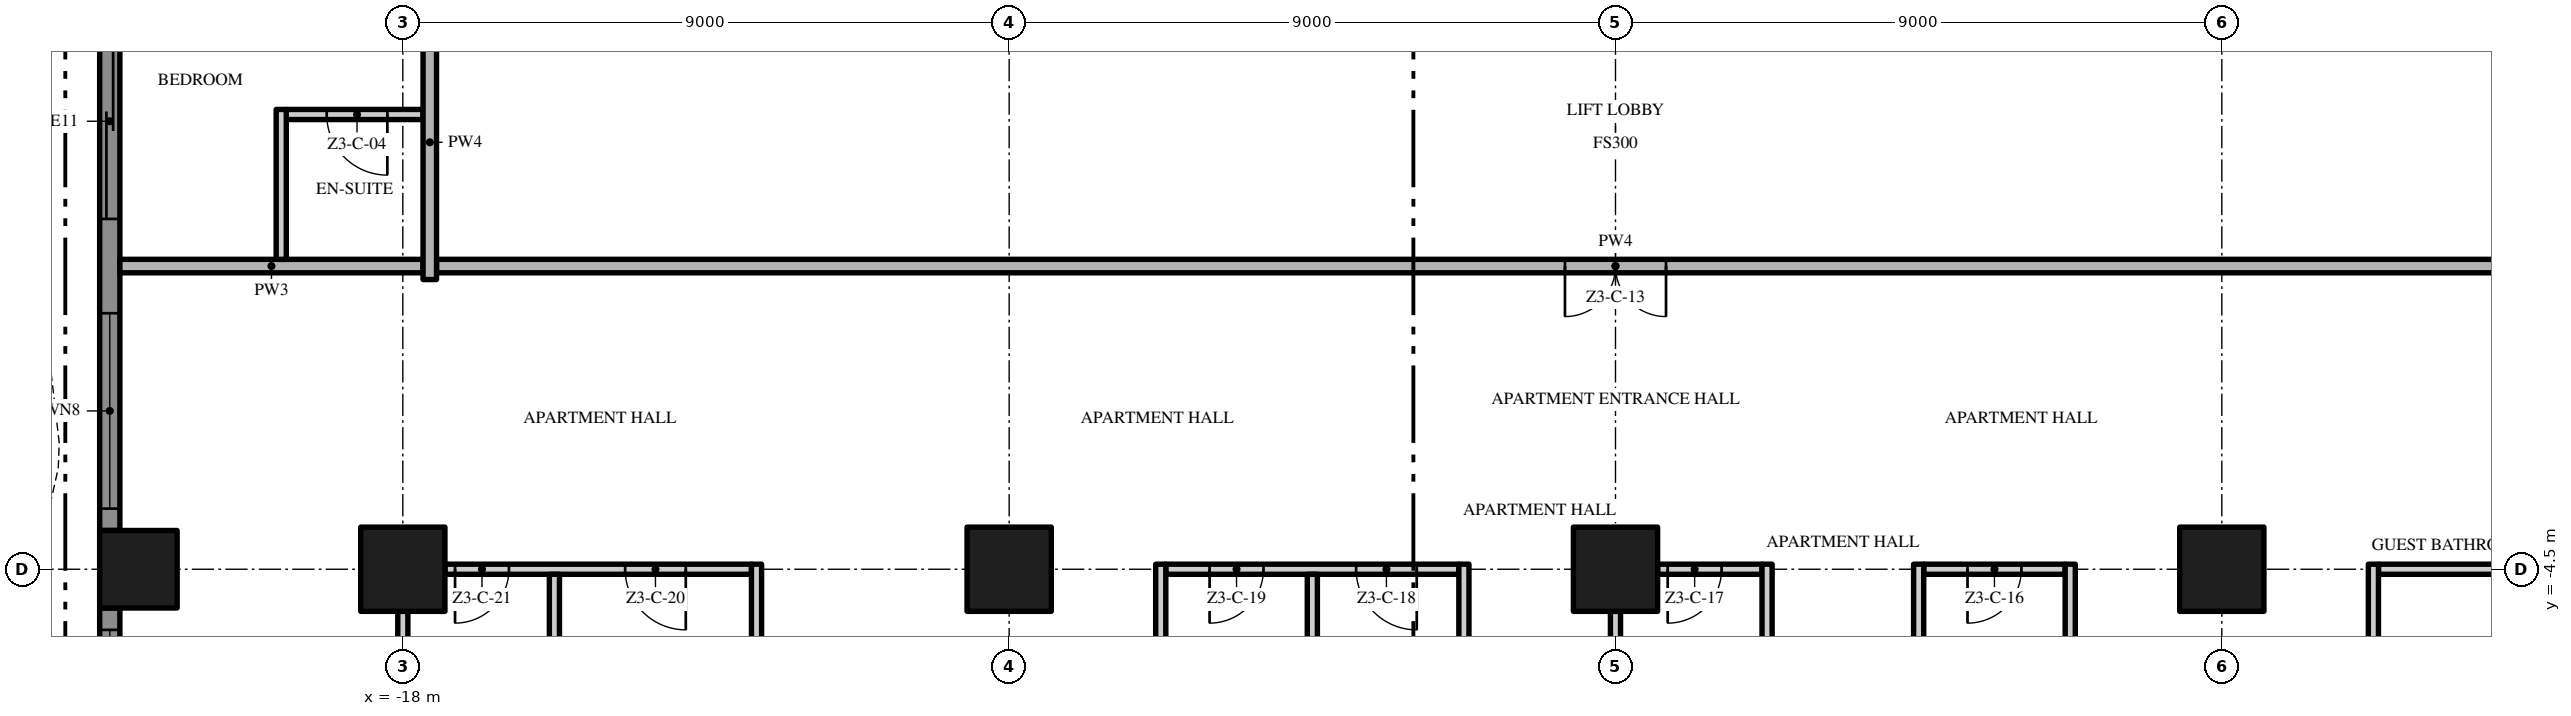
"""IFC4 building model, lengths in metres.
Left out: names, types, materials, properties, quantities, classifications, styles, units other than length and angle.
Written with IfcOpenShell. Run it as: python <this file> out.ifc"""

import sys

from ifc_helpers import new_model, si_unit, direction, frame, frame_2d, origin, origin_2d, place, context, subcontext, project, spatial, polyline, rectangle, outline, extrude, element, fill, save


model = new_model("IFC4")
c1 = context("Model", 3, precision=1e-05, world=origin(), true_north=direction((0.0, 1.0)))
c2 = subcontext(c1, "Body", "Model", "MODEL_VIEW")
j1 = project(units=[si_unit("LENGTHUNIT", "METRE"), si_unit("PLANEANGLEUNIT", "RADIAN")], contexts=[c1])
p1 = place(None, origin())
s1 = spatial("IfcSite", under=j1, at=p1, CompositionType="ELEMENT")
p2 = place(p1, origin())
s2 = spatial("IfcBuilding", under=s1, at=p2, CompositionType="ELEMENT")
p3 = place(p2, frame((0.0, 0.0, 155.4)))
s3 = spatial("IfcBuildingStorey", under=s2, at=p3, CompositionType="ELEMENT", Elevation=155.4)
p4 = place(p3, frame((-18.0, -4.5, 0.0), z_axis=(0.0, 0.0, 1.0), x_axis=(1.0, 0.0, 0.0)))
e1 = element("IfcColumn", 1, at=p4, inside=s3, PredefinedType="COLUMN", context=c2, shape_type="SweptSolid", body=[
    extrude(rectangle(XDim=1.25, YDim=1.25, at=origin_2d()), origin(), (0.0, 0.0, 1.0), 3.5),
])
p5 = place(p3, frame((-21.925, -4.5, 0.0), z_axis=(0.0, 0.0, 1.0), x_axis=(1.0, 0.0, 0.0)))
e2 = element("IfcColumn", 2, at=p5, inside=s3, PredefinedType="COLUMN", context=c2, shape_type="SweptSolid", body=[
    extrude(rectangle(XDim=1.15, YDim=1.15, at=origin_2d()), origin(), (0.0, 0.0, 1.0), 3.5),
])
for number, where, z_axis, x_axis in (
    (3, (-9.0, -4.5, 0.0), (0.0, 0.0, 1.0), (1.0, 0.0, 0.0)),
    (4, (0.0, -4.5, 0.0), (0.0, 0.0, 1.0), (1.0, 0.0, 0.0)),
    (5, (9.0, -4.5, 0.0), (0.0, 0.0, 1.0), (1.0, 0.0, 0.0)),
):
    element("IfcColumn", number, at=place(p3, frame(where, z_axis=z_axis, x_axis=x_axis)), inside=s3, PredefinedType="COLUMN", context=c2, shape_type="SweptSolid", body=[
        extrude(rectangle(XDim=1.25, YDim=1.25, at=origin_2d()), origin(), (0.0, 0.0, 1.0), 3.5),
    ])
p6 = place(p3, frame((-22.35, -3.925, 0.0), z_axis=(0.0, 0.0, 1.0), x_axis=(0.0, 1.0, 0.0)))
e6 = element("IfcWall", 6, at=p6, inside=s3, PredefinedType="SOLIDWALL", context=c2, shape_type="SweptSolid", body=[
    extrude(rectangle(XDim=7.85, YDim=0.3, at=frame_2d((3.925, 0.0))), origin(), (0.0, 0.0, 1.0), 3.5),
])
p7 = place(p6, frame((4.625, 0.0, 0.0)))
e7 = element("IfcOpeningElement", 7, at=p7, cuts=e6, PredefinedType="OPENING", context=c2, shape_type="SweptSolid", body=[
    extrude(rectangle(XDim=2.9, YDim=2.4, at=frame_2d((1.45, 1.2))), frame((0.0, 0.16, 0.0), z_axis=(0.0, -1.0, 0.0), x_axis=(1.0, 0.0, 0.0)), (0.0, 0.0, 1.0), 0.32),
])
p8 = place(p6, frame((0.325, 0.0, 0.45)))
e8 = element("IfcOpeningElement", 8, at=p8, cuts=e6, PredefinedType="OPENING", context=c2, shape_type="SweptSolid", body=[
    extrude(rectangle(XDim=2.9, YDim=2.65, at=frame_2d((1.45, 1.325))), frame((0.0, 0.16, 0.0), z_axis=(0.0, -1.0, 0.0), x_axis=(1.0, 0.0, 0.0)), (0.0, 0.0, 1.0), 0.32),
])
p9 = place(p3, frame((-22.35, -12.35, 0.0), z_axis=(0.0, 0.0, 1.0), x_axis=(0.0, 1.0, 0.0)))
e9 = element("IfcWall", 9, at=p9, inside=s3, PredefinedType="SOLIDWALL", context=c2, shape_type="SweptSolid", body=[
    extrude(rectangle(XDim=7.275, YDim=0.3, at=frame_2d((3.638, 0.0))), origin(), (0.0, 0.0, 1.0), 3.5),
])
p10 = place(p9, frame((4.05, 0.0, 0.45)))
e10 = element("IfcOpeningElement", 10, at=p10, cuts=e9, PredefinedType="OPENING", context=c2, shape_type="SweptSolid", body=[
    extrude(rectangle(XDim=2.9, YDim=2.65, at=frame_2d((1.45, 1.325))), frame((0.0, 0.16, 0.0), z_axis=(0.0, -1.0, 0.0), x_axis=(1.0, 0.0, 0.0)), (0.0, 0.0, 1.0), 0.32),
])
p11 = place(p9, frame((0.3, 0.0, 0.0)))
e11 = element("IfcOpeningElement", 11, at=p11, cuts=e9, PredefinedType="OPENING", context=c2, shape_type="SweptSolid", body=[
    extrude(rectangle(XDim=2.35, YDim=2.4, at=frame_2d((1.175, 1.2))), frame((0.0, 0.16, 0.0), z_axis=(0.0, -1.0, 0.0), x_axis=(1.0, 0.0, 0.0)), (0.0, 0.0, 1.0), 0.32),
])
p12 = place(p3, origin())
e12 = element("IfcWall", 12, at=p12, inside=s3, PredefinedType="USERDEFINED", context=c2, shape_type="SweptSolid", body=[
    extrude(outline(polyline([(-25.149, 18.0), (-24.488, 16.5), (-23.755, 15.0), (-23.231, 13.5), (-23.1, 12.375), (-23.115, 12.0), (-23.451, 10.5), (-24.112, 9.0), (-24.845, 7.5), (-25.369, 6.0), (-25.5, 4.875), (-25.485, 4.5), (-25.149, 3.0), (-24.488, 1.5), (-23.755, 0.0), (-23.231, -1.5), (-23.1, -2.625), (-23.115, -3.0), (-23.451, -4.5), (-24.112, -6.0), (-24.845, -7.5), (-25.369, -9.0), (-25.5, -10.125), (-25.485, -10.5), (-25.149, -12.0), (-24.488, -13.5), (-24.259, -13.399), (-24.91, -11.921), (-25.236, -10.467), (-25.249, -10.135), (-25.124, -9.056), (-24.614, -7.596), (-23.885, -6.105), (-23.213, -4.579), (-22.866, -3.033), (-22.849, -2.615), (-22.986, -1.444), (-23.524, 0.096), (-24.261, 1.605), (-24.91, 3.079), (-25.236, 4.533), (-25.249, 4.865), (-25.124, 5.944), (-24.614, 7.404), (-23.885, 8.895), (-23.213, 10.421), (-22.866, 11.967), (-22.849, 12.385), (-22.986, 13.556), (-23.524, 15.096), (-24.261, 16.605), (-24.92, 18.101), (-25.149, 18.0)])), origin(), (0.0, 0.0, 1.0), 0.9),
])
p13 = place(p3, frame((-12.825, -4.5, 0.0), z_axis=(0.0, 0.0, 1.0), x_axis=(-1.0, 0.0, 0.0)))
e13 = element("IfcWall", 13, at=p13, inside=s3, PredefinedType="PARTITIONING", context=c2, shape_type="SweptSolid", body=[
    extrude(rectangle(XDim=4.55, YDim=0.15, at=frame_2d((2.275, 0.0))), origin(), (0.0, 0.0, 1.0), 3.5),
])
p14 = place(p13, frame((0.975, 0.0, 0.0)))
e14 = element("IfcOpeningElement", 14, at=p14, cuts=e13, PredefinedType="OPENING", context=c2, shape_type="SweptSolid", body=[
    extrude(rectangle(XDim=0.9, YDim=2.1, at=frame_2d((0.45, 1.05))), frame((0.0, 0.085, 0.0), z_axis=(0.0, -1.0, 0.0), x_axis=(1.0, 0.0, 0.0)), (0.0, 0.0, 1.0), 0.17),
])
p15 = place(p13, frame((3.6, 0.0, 0.0)))
e15 = element("IfcOpeningElement", 15, at=p15, cuts=e13, PredefinedType="OPENING", context=c2, shape_type="SweptSolid", body=[
    extrude(rectangle(XDim=0.8, YDim=2.0, at=frame_2d((0.4, 1.0))), frame((0.0, 0.085, 0.0), z_axis=(0.0, -1.0, 0.0), x_axis=(1.0, 0.0, 0.0)), (0.0, 0.0, 1.0), 0.17),
])
p16 = place(p3, frame((-2.325, -4.5, 0.0), z_axis=(0.0, 0.0, 1.0), x_axis=(-1.0, 0.0, 0.0)))
e16 = element("IfcWall", 16, at=p16, inside=s3, PredefinedType="PARTITIONING", context=c2, shape_type="SweptSolid", body=[
    extrude(rectangle(XDim=4.35, YDim=0.15, at=frame_2d((2.175, 0.0))), origin(), (0.0, 0.0, 1.0), 3.5),
])
p17 = place(p16, frame((0.625, 0.0, 0.0)))
e17 = element("IfcOpeningElement", 17, at=p17, cuts=e16, PredefinedType="OPENING", context=c2, shape_type="SweptSolid", body=[
    extrude(rectangle(XDim=0.9, YDim=2.1, at=frame_2d((0.45, 1.05))), frame((0.0, 0.085, 0.0), z_axis=(0.0, -1.0, 0.0), x_axis=(1.0, 0.0, 0.0)), (0.0, 0.0, 1.0), 0.17),
])
p18 = place(p16, frame((2.9, 0.0, 0.0)))
e18 = element("IfcOpeningElement", 18, at=p18, cuts=e16, PredefinedType="OPENING", context=c2, shape_type="SweptSolid", body=[
    extrude(rectangle(XDim=0.8, YDim=2.0, at=frame_2d((0.4, 1.0))), frame((0.0, 0.085, 0.0), z_axis=(0.0, -1.0, 0.0), x_axis=(1.0, 0.0, 0.0)), (0.0, 0.0, 1.0), 0.17),
])
p19 = place(p3, frame((2.175, -4.5, 0.0), z_axis=(0.0, 0.0, 1.0), x_axis=(-1.0, 0.0, 0.0)))
e19 = element("IfcWall", 19, at=p19, inside=s3, PredefinedType="PARTITIONING", context=c2, shape_type="SweptSolid", body=[
    extrude(rectangle(XDim=1.55, YDim=0.15, at=frame_2d((0.775, 0.0))), origin(), (0.0, 0.0, 1.0), 3.5),
])
p20 = place(p19, frame((0.6, 0.0, 0.0)))
e20 = element("IfcOpeningElement", 20, at=p20, cuts=e19, PredefinedType="OPENING", context=c2, shape_type="SweptSolid", body=[
    extrude(rectangle(XDim=0.8, YDim=2.0, at=frame_2d((0.4, 1.0))), frame((0.0, 0.085, 0.0), z_axis=(0.0, -1.0, 0.0), x_axis=(1.0, 0.0, 0.0)), (0.0, 0.0, 1.0), 0.17),
])
p21 = place(p3, frame((6.675, -4.5, 0.0), z_axis=(0.0, 0.0, 1.0), x_axis=(-1.0, 0.0, 0.0)))
e21 = element("IfcWall", 21, at=p21, inside=s3, PredefinedType="PARTITIONING", context=c2, shape_type="SweptSolid", body=[
    extrude(rectangle(XDim=2.1, YDim=0.15, at=frame_2d((1.05, 0.0))), origin(), (0.0, 0.0, 1.0), 3.5),
])
p22 = place(p21, frame((0.65, 0.0, 0.0)))
e22 = element("IfcOpeningElement", 22, at=p22, cuts=e21, PredefinedType="OPENING", context=c2, shape_type="SweptSolid", body=[
    extrude(rectangle(XDim=0.8, YDim=2.0, at=frame_2d((0.4, 1.0))), frame((0.0, 0.085, 0.0), z_axis=(0.0, -1.0, 0.0), x_axis=(1.0, 0.0, 0.0)), (0.0, 0.0, 1.0), 0.17),
])
p23 = place(p3, frame((11.325, -4.5, 0.0), z_axis=(0.0, 0.0, 1.0), x_axis=(1.0, 0.0, 0.0)))
e23 = element("IfcWall", 23, at=p23, inside=s3, PredefinedType="PARTITIONING", context=c2, shape_type="SweptSolid", body=[
    extrude(rectangle(XDim=2.1, YDim=0.15, at=frame_2d((1.05, 0.0))), origin(), (0.0, 0.0, 1.0), 3.5),
])
p24 = place(p3, frame((17.5, 0.0, 0.0), z_axis=(0.0, 0.0, 1.0), x_axis=(-1.0, 0.0, 0.0)))
e24 = element("IfcWall", 24, at=p24, inside=s3, PredefinedType="PARTITIONING", context=c2, shape_type="SweptSolid", body=[
    extrude(rectangle(XDim=35.0, YDim=0.2, at=frame_2d((17.5, 0.0))), origin(), (0.0, 0.0, 1.0), 3.5),
])
p25 = place(p24, frame((16.75, 0.0, 0.0)))
e25 = element("IfcOpeningElement", 25, at=p25, cuts=e24, PredefinedType="OPENING", context=c2, shape_type="SweptSolid", body=[
    extrude(rectangle(XDim=1.5, YDim=2.4, at=frame_2d((0.75, 1.2))), frame((0.0, 0.11, 0.0), z_axis=(0.0, -1.0, 0.0), x_axis=(1.0, 0.0, 0.0)), (0.0, 0.0, 1.0), 0.22),
])
p26 = place(p3, frame((-22.2, 0.0, 0.0), z_axis=(0.0, 0.0, 1.0), x_axis=(1.0, 0.0, 0.0)))
e26 = element("IfcWall", 26, at=p26, inside=s3, PredefinedType="PARTITIONING", context=c2, shape_type="SweptSolid", body=[
    extrude(rectangle(XDim=4.5, YDim=0.2, at=frame_2d((2.25, 0.0))), origin(), (0.0, 0.0, 1.0), 3.5),
])
p27 = place(p3, frame((-17.7, 2.25, 0.0), z_axis=(0.0, 0.0, 1.0), x_axis=(-1.0, 0.0, 0.0)))
e27 = element("IfcWall", 27, at=p27, inside=s3, PredefinedType="PARTITIONING", context=c2, shape_type="SweptSolid", body=[
    extrude(rectangle(XDim=2.03, YDim=0.15, at=frame_2d((1.015, 0.0))), origin(), (0.0, 0.0, 1.0), 3.5),
])
p28 = place(p27, frame((0.53, 0.0, 0.0)))
e28 = element("IfcOpeningElement", 28, at=p28, cuts=e27, PredefinedType="OPENING", context=c2, shape_type="SweptSolid", body=[
    extrude(rectangle(XDim=0.9, YDim=2.1, at=frame_2d((0.45, 1.05))), frame((0.0, 0.085, 0.0), z_axis=(0.0, -1.0, 0.0), x_axis=(1.0, 0.0, 0.0)), (0.0, 0.0, 1.0), 0.17),
])
p29 = place(p3, frame((-19.805, 0.1, 0.0), z_axis=(0.0, 0.0, 1.0), x_axis=(0.0, 1.0, 0.0)))
e29 = element("IfcWall", 29, at=p29, inside=s3, PredefinedType="PARTITIONING", context=c2, shape_type="SweptSolid", body=[
    extrude(rectangle(XDim=2.225, YDim=0.15, at=frame_2d((1.113, 0.0))), origin(), (0.0, 0.0, 1.0), 3.5),
])
p30 = place(p3, frame((-18.0, -12.875, 0.0), z_axis=(0.0, 0.0, 1.0), x_axis=(0.0, 1.0, 0.0)))
e30 = element("IfcWall", 30, at=p30, inside=s3, PredefinedType="PARTITIONING", context=c2, shape_type="SweptSolid", body=[
    extrude(rectangle(XDim=7.75, YDim=0.15, at=frame_2d((3.875, 0.0))), origin(), (0.0, 0.0, 1.0), 3.5),
])
p31 = place(p3, frame((-17.6, -0.2, 0.0), z_axis=(0.0, 0.0, 1.0), x_axis=(0.0, 1.0, 0.0)))
e31 = element("IfcWall", 31, at=p31, inside=s3, PredefinedType="PARTITIONING", context=c2, shape_type="SweptSolid", body=[
    extrude(rectangle(XDim=4.075, YDim=0.2, at=frame_2d((2.038, 0.0))), origin(), (0.0, 0.0, 1.0), 3.5),
])
p32 = place(p3, frame((-15.75, -8.925, 0.0), z_axis=(0.0, 0.0, 1.0), x_axis=(0.0, 1.0, 0.0)))
e32 = element("IfcWall", 32, at=p32, inside=s3, PredefinedType="PARTITIONING", context=c2, shape_type="SweptSolid", body=[
    extrude(rectangle(XDim=4.35, YDim=0.15, at=frame_2d((2.175, 0.0))), origin(), (0.0, 0.0, 1.0), 3.5),
])
p33 = place(p3, frame((-12.75, -8.925, 0.0), z_axis=(0.0, 0.0, 1.0), x_axis=(0.0, 1.0, 0.0)))
e33 = element("IfcWall", 33, at=p33, inside=s3, PredefinedType="PARTITIONING", context=c2, shape_type="SweptSolid", body=[
    extrude(rectangle(XDim=4.5, YDim=0.15, at=frame_2d((2.25, 0.0))), origin(), (0.0, 0.0, 1.0), 3.5),
])
p34 = place(p3, frame((-6.75, -12.075, 0.0), z_axis=(0.0, 0.0, 1.0), x_axis=(0.0, 1.0, 0.0)))
e34 = element("IfcWall", 34, at=p34, inside=s3, PredefinedType="PARTITIONING", context=c2, shape_type="SweptSolid", body=[
    extrude(rectangle(XDim=7.65, YDim=0.15, at=frame_2d((3.825, 0.0))), origin(), (0.0, 0.0, 1.0), 3.5),
])
p35 = place(p3, frame((-4.5, -17.7, 0.0), z_axis=(0.0, 0.0, 1.0), x_axis=(0.0, 1.0, 0.0)))
e35 = element("IfcWall", 35, at=p35, inside=s3, PredefinedType="PARTITIONING", context=c2, shape_type="SweptSolid", body=[
    extrude(rectangle(XDim=13.125, YDim=0.15, at=frame_2d((6.562, 0.0))), origin(), (0.0, 0.0, 1.0), 3.5),
])
p36 = place(p3, frame((-2.25, -12.075, 0.0), z_axis=(0.0, 0.0, 1.0), x_axis=(0.0, 1.0, 0.0)))
e36 = element("IfcWall", 36, at=p36, inside=s3, PredefinedType="PARTITIONING", context=c2, shape_type="SweptSolid", body=[
    extrude(rectangle(XDim=7.65, YDim=0.15, at=frame_2d((3.825, 0.0))), origin(), (0.0, 0.0, 1.0), 3.5),
])
p37 = place(p3, frame((0.0, -12.875, 0.0), z_axis=(0.0, 0.0, 1.0), x_axis=(0.0, 1.0, 0.0)))
e37 = element("IfcWall", 37, at=p37, inside=s3, PredefinedType="PARTITIONING", context=c2, shape_type="SweptSolid", body=[
    extrude(rectangle(XDim=7.75, YDim=0.15, at=frame_2d((3.875, 0.0))), origin(), (0.0, 0.0, 1.0), 3.5),
])
p38 = place(p3, frame((2.25, -8.925, 0.0), z_axis=(0.0, 0.0, 1.0), x_axis=(0.0, 1.0, 0.0)))
e38 = element("IfcWall", 38, at=p38, inside=s3, PredefinedType="PARTITIONING", context=c2, shape_type="SweptSolid", body=[
    extrude(rectangle(XDim=4.5, YDim=0.15, at=frame_2d((2.25, 0.0))), origin(), (0.0, 0.0, 1.0), 3.5),
])
p39 = place(p3, frame((4.5, -17.7, 0.0), z_axis=(0.0, 0.0, 1.0), x_axis=(0.0, 1.0, 0.0)))
e39 = element("IfcWall", 39, at=p39, inside=s3, PredefinedType="PARTITIONING", context=c2, shape_type="SweptSolid", body=[
    extrude(rectangle(XDim=13.275, YDim=0.15, at=frame_2d((6.638, 0.0))), origin(), (0.0, 0.0, 1.0), 3.5),
])
for number, where, z_axis, x_axis in (
    (40, (6.75, -12.075, 0.0), (0.0, 0.0, 1.0), (0.0, 1.0, 0.0)),
    (41, (11.25, -12.075, 0.0), (0.0, 0.0, 1.0), (0.0, 1.0, 0.0)),
):
    element("IfcWall", number, at=place(p3, frame(where, z_axis=z_axis, x_axis=x_axis)), inside=s3, PredefinedType="PARTITIONING", context=c2, shape_type="SweptSolid", body=[
        extrude(rectangle(XDim=7.65, YDim=0.15, at=frame_2d((3.825, 0.0))), origin(), (0.0, 0.0, 1.0), 3.5),
    ])
p40 = place(p7, origin())
e42 = element("IfcDoor", 42, at=p40, inside=s3, OperationType="SINGLE_SWING_LEFT", PredefinedType="DOOR", context=c2, shape_type="SweptSolid", body=[
    extrude(rectangle(XDim=2.9, YDim=2.4, at=frame_2d((1.45, 1.2))), frame((0.0, 0.025, 0.0), z_axis=(0.0, -1.0, 0.0), x_axis=(1.0, 0.0, 0.0)), (0.0, 0.0, 1.0), 0.05),
])
fill(e7, e42)
p41 = place(p8, origin())
e43 = element("IfcWindow", 43, at=p41, inside=s3, PartitioningType="SINGLE_PANEL", PredefinedType="WINDOW", context=c2, shape_type="SweptSolid", body=[
    extrude(rectangle(XDim=2.9, YDim=2.65, at=frame_2d((1.45, 1.325))), frame((0.0, 0.03, 0.0), z_axis=(0.0, -1.0, 0.0), x_axis=(1.0, 0.0, 0.0)), (0.0, 0.0, 1.0), 0.06),
])
fill(e8, e43)
p42 = place(p10, origin())
e44 = element("IfcWindow", 44, at=p42, inside=s3, PartitioningType="SINGLE_PANEL", PredefinedType="WINDOW", context=c2, shape_type="SweptSolid", body=[
    extrude(rectangle(XDim=2.9, YDim=2.65, at=frame_2d((1.45, 1.325))), frame((0.0, 0.03, 0.0), z_axis=(0.0, -1.0, 0.0), x_axis=(1.0, 0.0, 0.0)), (0.0, 0.0, 1.0), 0.06),
])
fill(e10, e44)
p43 = place(p28, origin())
e45 = element("IfcDoor", 45, at=p43, inside=s3, OperationType="SINGLE_SWING_LEFT", PredefinedType="DOOR", context=c2, shape_type="SweptSolid", body=[
    extrude(rectangle(XDim=0.9, YDim=2.1, at=frame_2d((0.45, 1.05))), frame((0.0, 0.025, 0.0), z_axis=(0.0, -1.0, 0.0), x_axis=(1.0, 0.0, 0.0)), (0.0, 0.0, 1.0), 0.05),
])
fill(e28, e45)
p44 = place(p25, origin())
e46 = element("IfcDoor", 46, at=p44, inside=s3, OperationType="DOUBLE_DOOR_SINGLE_SWING", PredefinedType="DOOR", context=c2, shape_type="SweptSolid", body=[
    extrude(rectangle(XDim=1.5, YDim=2.4, at=frame_2d((0.75, 1.2))), frame((0.0, 0.025, 0.0), z_axis=(0.0, -1.0, 0.0), x_axis=(1.0, 0.0, 0.0)), (0.0, 0.0, 1.0), 0.05),
])
fill(e25, e46)
p45 = place(p22, origin())
e47 = element("IfcDoor", 47, at=p45, inside=s3, OperationType="SINGLE_SWING_RIGHT", PredefinedType="DOOR", context=c2, shape_type="SweptSolid", body=[
    extrude(rectangle(XDim=0.8, YDim=2.0, at=frame_2d((0.4, 1.0))), frame((0.0, 0.025, 0.0), z_axis=(0.0, -1.0, 0.0), x_axis=(1.0, 0.0, 0.0)), (0.0, 0.0, 1.0), 0.05),
])
fill(e22, e47)
p46 = place(p20, origin())
e48 = element("IfcDoor", 48, at=p46, inside=s3, OperationType="SINGLE_SWING_RIGHT", PredefinedType="DOOR", context=c2, shape_type="SweptSolid", body=[
    extrude(rectangle(XDim=0.8, YDim=2.0, at=frame_2d((0.4, 1.0))), frame((0.0, 0.025, 0.0), z_axis=(0.0, -1.0, 0.0), x_axis=(1.0, 0.0, 0.0)), (0.0, 0.0, 1.0), 0.05),
])
fill(e20, e48)
p47 = place(p17, origin())
e49 = element("IfcDoor", 49, at=p47, inside=s3, OperationType="SINGLE_SWING_LEFT", PredefinedType="DOOR", context=c2, shape_type="SweptSolid", body=[
    extrude(rectangle(XDim=0.9, YDim=2.1, at=frame_2d((0.45, 1.05))), frame((0.0, 0.025, 0.0), z_axis=(0.0, -1.0, 0.0), x_axis=(1.0, 0.0, 0.0)), (0.0, 0.0, 1.0), 0.05),
])
fill(e17, e49)
p48 = place(p18, origin())
e50 = element("IfcDoor", 50, at=p48, inside=s3, OperationType="SINGLE_SWING_RIGHT", PredefinedType="DOOR", context=c2, shape_type="SweptSolid", body=[
    extrude(rectangle(XDim=0.8, YDim=2.0, at=frame_2d((0.4, 1.0))), frame((0.0, 0.025, 0.0), z_axis=(0.0, -1.0, 0.0), x_axis=(1.0, 0.0, 0.0)), (0.0, 0.0, 1.0), 0.05),
])
fill(e18, e50)
p49 = place(p14, origin())
e51 = element("IfcDoor", 51, at=p49, inside=s3, OperationType="SINGLE_SWING_LEFT", PredefinedType="DOOR", context=c2, shape_type="SweptSolid", body=[
    extrude(rectangle(XDim=0.9, YDim=2.1, at=frame_2d((0.45, 1.05))), frame((0.0, 0.025, 0.0), z_axis=(0.0, -1.0, 0.0), x_axis=(1.0, 0.0, 0.0)), (0.0, 0.0, 1.0), 0.05),
])
fill(e14, e51)
p50 = place(p15, origin())
e52 = element("IfcDoor", 52, at=p50, inside=s3, OperationType="SINGLE_SWING_RIGHT", PredefinedType="DOOR", context=c2, shape_type="SweptSolid", body=[
    extrude(rectangle(XDim=0.8, YDim=2.0, at=frame_2d((0.4, 1.0))), frame((0.0, 0.025, 0.0), z_axis=(0.0, -1.0, 0.0), x_axis=(1.0, 0.0, 0.0)), (0.0, 0.0, 1.0), 0.05),
])
fill(e15, e52)
save(model, sys.argv[1])
